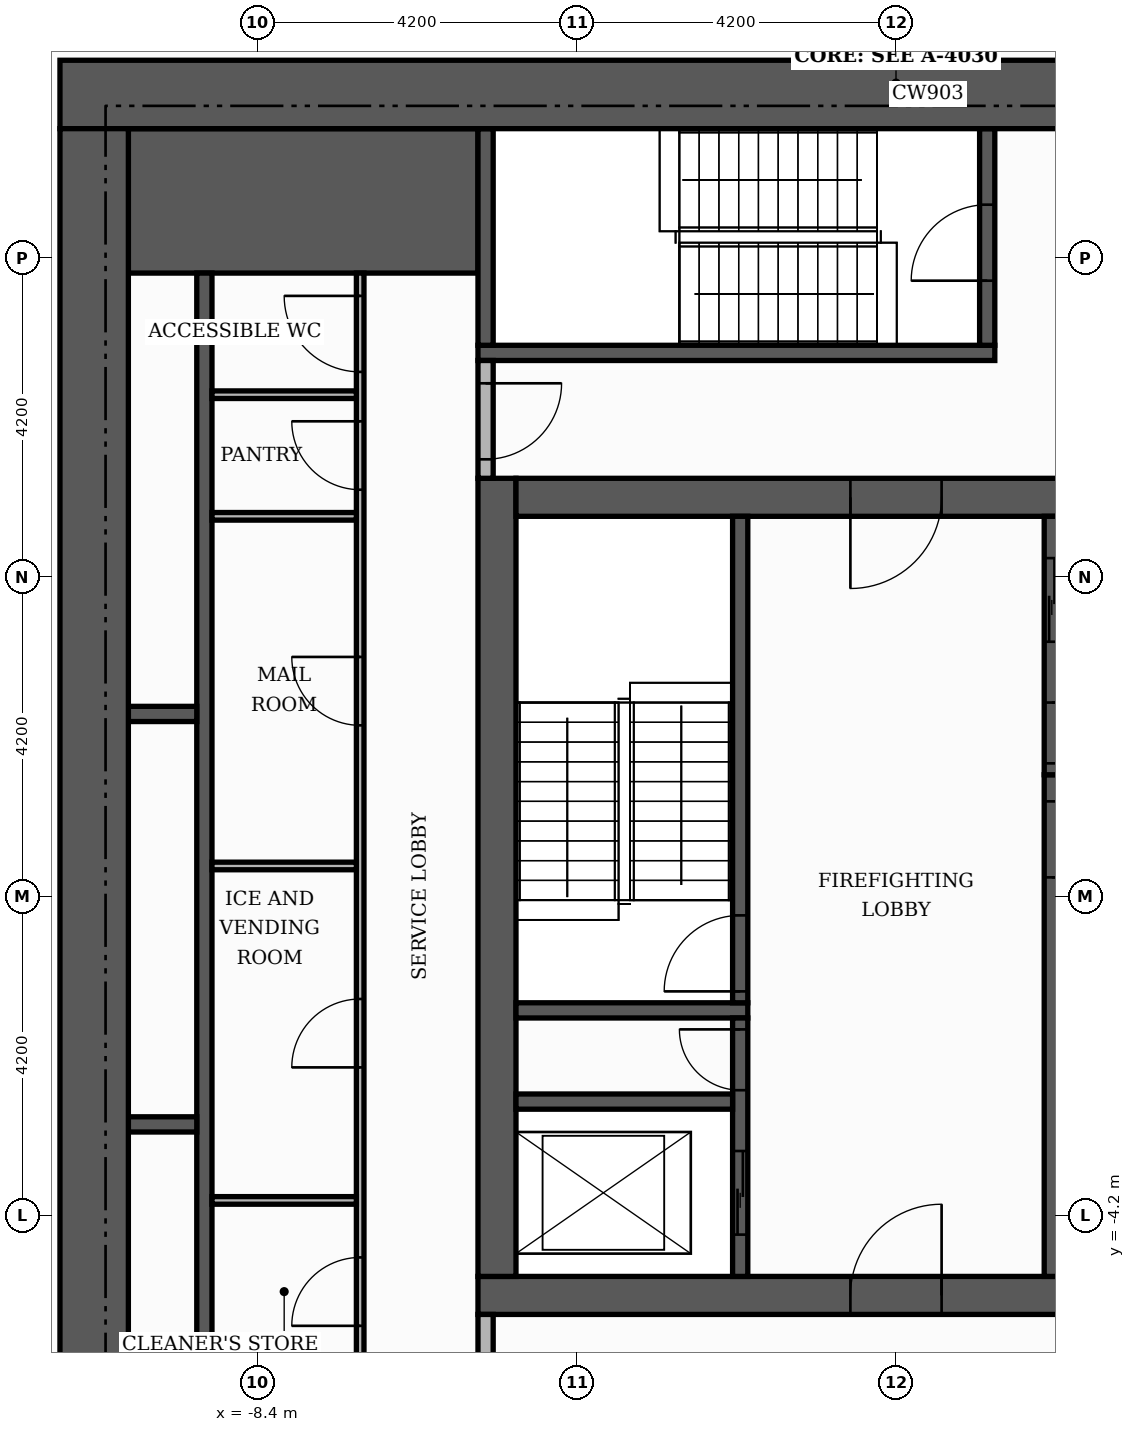
"""IFC4 building model, lengths in metres.
Left out: names, types, materials, properties, quantities, classifications, styles, units other than length and angle.
Written with IfcOpenShell. Run it as: python <this file> out.ifc"""

import sys

from ifc_helpers import new_model, si_unit, direction, frame, frame_2d, origin, place, context, subcontext, project, spatial, rectangle, extrude, element, fill, save


model = new_model("IFC4")
c1 = context("Model", 3, precision=1e-05, world=origin(), true_north=direction((0.0, 1.0)))
c2 = subcontext(c1, "Body", "Model", "MODEL_VIEW")
j1 = project(units=[si_unit("LENGTHUNIT", "METRE"), si_unit("PLANEANGLEUNIT", "RADIAN")], contexts=[c1])
p1 = place(None, origin())
s1 = spatial("IfcSite", under=j1, at=p1, CompositionType="ELEMENT")
p2 = place(p1, origin())
s2 = spatial("IfcBuilding", under=s1, at=p2, CompositionType="ELEMENT")
p3 = place(p2, frame((0.0, 0.0, 180.6)))
s3 = spatial("IfcBuildingStorey", under=s2, at=p3, CompositionType="ELEMENT", Elevation=180.6)
p4 = place(p3, frame((-5.5, -5.25, 0.0), z_axis=(0.0, 0.0, 1.0), x_axis=(1.0, 0.0, 0.0)))
e1 = element("IfcWall", 1, at=p4, inside=s3, PredefinedType="SHEAR", context=c2, shape_type="SweptSolid", body=[
    extrude(rectangle(XDim=11.0, YDim=0.5, at=frame_2d((5.5, 0.0))), origin(), (0.0, 0.0, 1.0), 7.38),
])
p5 = place(p4, frame((4.9, 0.0, 0.0)))
e2 = element("IfcOpeningElement", 2, at=p5, cuts=e1, PredefinedType="OPENING", context=c2, shape_type="SweptSolid", body=[
    extrude(rectangle(XDim=1.2, YDim=2.1, at=frame_2d((0.6, 1.05))), frame((0.0, 0.26, 0.0), z_axis=(0.0, -1.0, 0.0), x_axis=(1.0, 0.0, 0.0)), (0.0, 0.0, 1.0), 0.52),
])
p6 = place(p3, frame((-5.25, -5.0, 0.0), z_axis=(0.0, 0.0, 1.0), x_axis=(0.0, 1.0, 0.0)))
e3 = element("IfcWall", 3, at=p6, inside=s3, PredefinedType="SHEAR", context=c2, shape_type="SweptSolid", body=[
    extrude(rectangle(XDim=10.5, YDim=0.5, at=frame_2d((5.25, 0.0))), origin(), (0.0, 0.0, 1.0), 7.38),
])
p7 = place(p3, frame((-5.0, 5.25, 0.0), z_axis=(0.0, 0.0, 1.0), x_axis=(1.0, 0.0, 0.0)))
e4 = element("IfcWall", 4, at=p7, inside=s3, PredefinedType="SHEAR", context=c2, shape_type="SweptSolid", body=[
    extrude(rectangle(XDim=10.0, YDim=0.5, at=frame_2d((5.0, 0.0))), origin(), (0.0, 0.0, 1.0), 7.38),
])
p8 = place(p7, frame((4.4, 0.0, 0.0)))
e5 = element("IfcOpeningElement", 5, at=p8, cuts=e4, PredefinedType="OPENING", context=c2, shape_type="SweptSolid", body=[
    extrude(rectangle(XDim=1.2, YDim=2.1, at=frame_2d((0.6, 1.05))), frame((0.0, 0.26, 0.0), z_axis=(0.0, -1.0, 0.0), x_axis=(1.0, 0.0, 0.0)), (0.0, 0.0, 1.0), 0.52),
])
p9 = place(p3, frame((-10.1, 9.15, 0.0), z_axis=(0.0, 0.0, 1.0), x_axis=(1.0, 0.0, 0.0)))
e6 = element("IfcWall", 6, at=p9, inside=s3, PredefinedType="SHEAR", context=c2, shape_type="SweptSolid", body=[
    extrude(rectangle(XDim=4.6, YDim=1.9, at=frame_2d((2.3, 0.0))), origin(), (0.0, 0.0, 1.0), 7.38),
])
p10 = place(p3, frame((2.05, -5.0, 0.0), z_axis=(0.0, 0.0, 1.0), x_axis=(0.0, 1.0, 0.0)))
e7 = element("IfcWall", 7, at=p10, inside=s3, PredefinedType="SHEAR", context=c2, shape_type="SweptSolid", body=[
    extrude(rectangle(XDim=6.6, YDim=0.2, at=frame_2d((3.3, 0.0))), origin(), (0.0, 0.0, 1.0), 7.38),
])
p11 = place(p10, frame((5.25, 0.0, 0.0)))
e8 = element("IfcOpeningElement", 8, at=p11, cuts=e7, PredefinedType="OPENING", context=c2, shape_type="SweptSolid", body=[
    extrude(rectangle(XDim=1.0, YDim=2.1, at=frame_2d((0.5, 1.05))), frame((0.0, 0.11, 0.0), z_axis=(0.0, -1.0, 0.0), x_axis=(1.0, 0.0, 0.0)), (0.0, 0.0, 1.0), 0.22),
])
p12 = place(p3, frame((-5.0, -1.5, 0.0), z_axis=(0.0, 0.0, 1.0), x_axis=(1.0, 0.0, 0.0)))
e9 = element("IfcWall", 9, at=p12, inside=s3, PredefinedType="SHEAR", context=c2, shape_type="SweptSolid", body=[
    extrude(rectangle(XDim=3.05, YDim=0.2, at=frame_2d((1.525, 0.0))), origin(), (0.0, 0.0, 1.0), 7.38),
])
p13 = place(p3, frame((-2.05, -1.4, 0.0), z_axis=(0.0, 0.0, 1.0), x_axis=(0.0, 1.0, 0.0)))
e10 = element("IfcWall", 10, at=p13, inside=s3, PredefinedType="SHEAR", context=c2, shape_type="SweptSolid", body=[
    extrude(rectangle(XDim=6.4, YDim=0.2, at=frame_2d((3.2, 0.0))), origin(), (0.0, 0.0, 1.0), 7.38),
])
p14 = place(p13, frame((0.15, 0.0, 0.0)))
e11 = element("IfcOpeningElement", 11, at=p14, cuts=e10, PredefinedType="OPENING", context=c2, shape_type="SweptSolid", body=[
    extrude(rectangle(XDim=1.0, YDim=2.1, at=frame_2d((0.5, 1.05))), frame((0.0, 0.11, 0.0), z_axis=(0.0, -1.0, 0.0), x_axis=(1.0, 0.0, 0.0)), (0.0, 0.0, 1.0), 0.22),
])
p15 = place(p3, frame((-5.5, 7.15, 0.0), z_axis=(0.0, 0.0, 1.0), x_axis=(1.0, 0.0, 0.0)))
e12 = element("IfcWall", 12, at=p15, inside=s3, PredefinedType="SHEAR", context=c2, shape_type="SweptSolid", body=[
    extrude(rectangle(XDim=6.8, YDim=0.2, at=frame_2d((3.4, 0.0))), origin(), (0.0, 0.0, 1.0), 7.38),
])
p16 = place(p3, frame((-5.4, 7.25, 0.0), z_axis=(0.0, 0.0, 1.0), x_axis=(0.0, 1.0, 0.0)))
e13 = element("IfcWall", 13, at=p16, inside=s3, PredefinedType="SHEAR", context=c2, shape_type="SweptSolid", body=[
    extrude(rectangle(XDim=2.85, YDim=0.2, at=frame_2d((1.425, 0.0))), origin(), (0.0, 0.0, 1.0), 7.38),
])
p17 = place(p3, frame((1.2, 7.25, 0.0), z_axis=(0.0, 0.0, 1.0), x_axis=(0.0, 1.0, 0.0)))
e14 = element("IfcWall", 14, at=p17, inside=s3, PredefinedType="SHEAR", context=c2, shape_type="SweptSolid", body=[
    extrude(rectangle(XDim=2.85, YDim=0.2, at=frame_2d((1.425, 0.0))), origin(), (0.0, 0.0, 1.0), 7.38),
])
p18 = place(p17, frame((0.85, 0.0, 0.0)))
e15 = element("IfcOpeningElement", 15, at=p18, cuts=e14, PredefinedType="OPENING", context=c2, shape_type="SweptSolid", body=[
    extrude(rectangle(XDim=1.0, YDim=2.1, at=frame_2d((0.5, 1.05))), frame((0.0, 0.11, 0.0), z_axis=(0.0, -1.0, 0.0), x_axis=(1.0, 0.0, 0.0)), (0.0, 0.0, 1.0), 0.22),
])
p19 = place(p3, frame((-9.1, -8.2, 0.0), z_axis=(0.0, 0.0, 1.0), x_axis=(0.0, 1.0, 0.0)))
e16 = element("IfcWall", 16, at=p19, inside=s3, PredefinedType="SHEAR", context=c2, shape_type="SweptSolid", body=[
    extrude(rectangle(XDim=16.4, YDim=0.2, at=frame_2d((8.2, 0.0))), origin(), (0.0, 0.0, 1.0), 7.38),
])
p20 = place(p3, frame((-2.05, -5.0, 0.0), z_axis=(0.0, 0.0, 1.0), x_axis=(0.0, 1.0, 0.0)))
e17 = element("IfcWall", 17, at=p20, inside=s3, PredefinedType="SHEAR", context=c2, shape_type="SweptSolid", body=[
    extrude(rectangle(XDim=3.4, YDim=0.2, at=frame_2d((1.7, 0.0))), origin(), (0.0, 0.0, 1.0), 7.38),
])
p21 = place(p20, frame((0.55, 0.0, 0.0)))
e18 = element("IfcOpeningElement", 18, at=p21, cuts=e17, PredefinedType="OPENING", context=c2, shape_type="SweptSolid", body=[
    extrude(rectangle(XDim=1.1, YDim=2.1, at=frame_2d((0.55, 1.05))), frame((0.0, 0.11, 0.0), z_axis=(0.0, -1.0, 0.0), x_axis=(1.0, 0.0, 0.0)), (0.0, 0.0, 1.0), 0.22),
])
p22 = place(p20, frame((2.45, 0.0, 0.0)))
e19 = element("IfcOpeningElement", 19, at=p22, cuts=e17, PredefinedType="OPENING", context=c2, shape_type="SweptSolid", body=[
    extrude(rectangle(XDim=0.8, YDim=2.1, at=frame_2d((0.4, 1.05))), frame((0.0, 0.11, 0.0), z_axis=(0.0, -1.0, 0.0), x_axis=(1.0, 0.0, 0.0)), (0.0, 0.0, 1.0), 0.22),
])
p23 = place(p3, frame((-10.1, -3.0, 0.0), z_axis=(0.0, 0.0, 1.0), x_axis=(1.0, 0.0, 0.0)))
e20 = element("IfcWall", 20, at=p23, inside=s3, PredefinedType="SHEAR", context=c2, shape_type="SweptSolid", body=[
    extrude(rectangle(XDim=0.9, YDim=0.2, at=frame_2d((0.45, 0.0))), origin(), (0.0, 0.0, 1.0), 7.38),
])
p24 = place(p3, frame((-5.0, -2.7, 0.0), z_axis=(0.0, 0.0, 1.0), x_axis=(1.0, 0.0, 0.0)))
e21 = element("IfcWall", 21, at=p24, inside=s3, PredefinedType="SHEAR", context=c2, shape_type="SweptSolid", body=[
    extrude(rectangle(XDim=2.85, YDim=0.2, at=frame_2d((1.425, 0.0))), origin(), (0.0, 0.0, 1.0), 7.38),
])
p25 = place(p3, frame((2.05, 1.6, 0.0), z_axis=(0.0, 0.0, 1.0), x_axis=(0.0, 1.0, 0.0)))
e22 = element("IfcWall", 22, at=p25, inside=s3, PredefinedType="SHEAR", context=c2, shape_type="SweptSolid", body=[
    extrude(rectangle(XDim=3.4, YDim=0.2, at=frame_2d((1.7, 0.0))), origin(), (0.0, 0.0, 1.0), 7.38),
])
p26 = place(p25, frame((1.75, 0.0, 0.0)))
e23 = element("IfcOpeningElement", 23, at=p26, cuts=e22, PredefinedType="OPENING", context=c2, shape_type="SweptSolid", body=[
    extrude(rectangle(XDim=1.1, YDim=2.1, at=frame_2d((0.55, 1.05))), frame((0.0, 0.11, 0.0), z_axis=(0.0, -1.0, 0.0), x_axis=(1.0, 0.0, 0.0)), (0.0, 0.0, 1.0), 0.22),
])
p27 = place(p25, frame((0.15, 0.0, 0.0)))
e24 = element("IfcOpeningElement", 24, at=p27, cuts=e22, PredefinedType="OPENING", context=c2, shape_type="SweptSolid", body=[
    extrude(rectangle(XDim=0.8, YDim=2.1, at=frame_2d((0.4, 1.05))), frame((0.0, 0.11, 0.0), z_axis=(0.0, -1.0, 0.0), x_axis=(1.0, 0.0, 0.0)), (0.0, 0.0, 1.0), 0.22),
])
p28 = place(p3, frame((-10.1, 2.4, 0.0), z_axis=(0.0, 0.0, 1.0), x_axis=(1.0, 0.0, 0.0)))
e25 = element("IfcWall", 25, at=p28, inside=s3, PredefinedType="SHEAR", context=c2, shape_type="SweptSolid", body=[
    extrude(rectangle(XDim=0.9, YDim=0.2, at=frame_2d((0.45, 0.0))), origin(), (0.0, 0.0, 1.0), 7.38),
])
p29 = place(p3, frame((-11.0, 10.55, 0.0), z_axis=(0.0, 0.0, 1.0), x_axis=(1.0, 0.0, 0.0)))
e26 = element("IfcWall", 26, at=p29, inside=s3, PredefinedType="SHEAR", context=c2, shape_type="SweptSolid", body=[
    extrude(rectangle(XDim=22.0, YDim=0.9, at=frame_2d((11.0, 0.0))), origin(), (0.0, 0.0, 1.0), 7.38),
])
p30 = place(p29, frame((13.3, 0.0, 0.0)))
e27 = element("IfcOpeningElement", 27, at=p30, cuts=e26, PredefinedType="OPENING", context=c2, shape_type="SweptSolid", body=[
    extrude(rectangle(XDim=1.8, YDim=2.2, at=frame_2d((0.9, 1.1))), frame((0.0, 0.46, 0.0), z_axis=(0.0, -1.0, 0.0), x_axis=(1.0, 0.0, 0.0)), (0.0, 0.0, 1.0), 0.92),
])
p31 = place(p3, frame((-10.55, -10.1, 0.0), z_axis=(0.0, 0.0, 1.0), x_axis=(0.0, 1.0, 0.0)))
e28 = element("IfcWall", 28, at=p31, inside=s3, PredefinedType="SHEAR", context=c2, shape_type="SweptSolid", body=[
    extrude(rectangle(XDim=20.2, YDim=0.9, at=frame_2d((10.1, 0.0))), origin(), (0.0, 0.0, 1.0), 7.38),
])
p32 = place(p3, frame((-5.4, -10.1, 0.0), z_axis=(0.0, 0.0, 1.0), x_axis=(0.0, 1.0, 0.0)))
e29 = element("IfcWall", 29, at=p32, inside=s3, PredefinedType="PARTITIONING", context=c2, shape_type="SweptSolid", body=[
    extrude(rectangle(XDim=4.6, YDim=0.2, at=frame_2d((2.3, 0.0))), origin(), (0.0, 0.0, 1.0), 7.38),
])
p33 = place(p32, frame((2.9, 0.0, 0.0)))
e30 = element("IfcOpeningElement", 30, at=p33, cuts=e29, PredefinedType="OPENING", context=c2, shape_type="SweptSolid", body=[
    extrude(rectangle(XDim=1.0, YDim=2.1, at=frame_2d((0.5, 1.05))), frame((0.0, 0.11, 0.0), z_axis=(0.0, -1.0, 0.0), x_axis=(1.0, 0.0, 0.0)), (0.0, 0.0, 1.0), 0.22),
])
p34 = place(p3, frame((-7.05, -8.2, 0.0), z_axis=(0.0, 0.0, 1.0), x_axis=(0.0, 1.0, 0.0)))
e31 = element("IfcWall", 31, at=p34, inside=s3, PredefinedType="PARTITIONING", context=c2, shape_type="SweptSolid", body=[
    extrude(rectangle(XDim=16.4, YDim=0.1, at=frame_2d((8.2, 0.0))), origin(), (0.0, 0.0, 1.0), 7.38),
])
p35 = place(p34, frame((0.45, 0.0, 0.0)))
e32 = element("IfcOpeningElement", 32, at=p35, cuts=e31, PredefinedType="OPENING", context=c2, shape_type="SweptSolid", body=[
    extrude(rectangle(XDim=0.9, YDim=2.1, at=frame_2d((0.45, 1.05))), frame((0.0, 0.06, 0.0), z_axis=(0.0, -1.0, 0.0), x_axis=(1.0, 0.0, 0.0)), (0.0, 0.0, 1.0), 0.12),
])
p36 = place(p34, frame((2.55, 0.0, 0.0)))
e33 = element("IfcOpeningElement", 33, at=p36, cuts=e31, PredefinedType="OPENING", context=c2, shape_type="SweptSolid", body=[
    extrude(rectangle(XDim=0.9, YDim=2.1, at=frame_2d((0.45, 1.05))), frame((0.0, 0.06, 0.0), z_axis=(0.0, -1.0, 0.0), x_axis=(1.0, 0.0, 0.0)), (0.0, 0.0, 1.0), 0.12),
])
p37 = place(p34, frame((5.95, 0.0, 0.0)))
e34 = element("IfcOpeningElement", 34, at=p37, cuts=e31, PredefinedType="OPENING", context=c2, shape_type="SweptSolid", body=[
    extrude(rectangle(XDim=0.9, YDim=2.1, at=frame_2d((0.45, 1.05))), frame((0.0, 0.06, 0.0), z_axis=(0.0, -1.0, 0.0), x_axis=(1.0, 0.0, 0.0)), (0.0, 0.0, 1.0), 0.12),
])
p38 = place(p34, frame((10.45, 0.0, 0.0)))
e35 = element("IfcOpeningElement", 35, at=p38, cuts=e31, PredefinedType="OPENING", context=c2, shape_type="SweptSolid", body=[
    extrude(rectangle(XDim=0.9, YDim=2.1, at=frame_2d((0.45, 1.05))), frame((0.0, 0.06, 0.0), z_axis=(0.0, -1.0, 0.0), x_axis=(1.0, 0.0, 0.0)), (0.0, 0.0, 1.0), 0.12),
])
p39 = place(p34, frame((13.55, 0.0, 0.0)))
e36 = element("IfcOpeningElement", 36, at=p39, cuts=e31, PredefinedType="OPENING", context=c2, shape_type="SweptSolid", body=[
    extrude(rectangle(XDim=0.9, YDim=2.1, at=frame_2d((0.45, 1.05))), frame((0.0, 0.06, 0.0), z_axis=(0.0, -1.0, 0.0), x_axis=(1.0, 0.0, 0.0)), (0.0, 0.0, 1.0), 0.12),
])
p40 = place(p34, frame((15.1, 0.0, 0.0)))
e37 = element("IfcOpeningElement", 37, at=p40, cuts=e31, PredefinedType="OPENING", context=c2, shape_type="SweptSolid", body=[
    extrude(rectangle(XDim=1.0, YDim=2.1, at=frame_2d((0.5, 1.05))), frame((0.0, 0.06, 0.0), z_axis=(0.0, -1.0, 0.0), x_axis=(1.0, 0.0, 0.0)), (0.0, 0.0, 1.0), 0.12),
])
for number, where, z_axis, x_axis in (
    (38, (-9.0, -4.0, 0.0), (0.0, 0.0, 1.0), (1.0, 0.0, 0.0)),
    (39, (-9.0, 0.4, 0.0), (0.0, 0.0, 1.0), (1.0, 0.0, 0.0)),
    (40, (-9.0, 5.0, 0.0), (0.0, 0.0, 1.0), (1.0, 0.0, 0.0)),
):
    element("IfcWall", number, at=place(p3, frame(where, z_axis=z_axis, x_axis=x_axis)), inside=s3, PredefinedType="PARTITIONING", context=c2, shape_type="SweptSolid", body=[
        extrude(rectangle(XDim=1.9, YDim=0.1, at=frame_2d((0.95, 0.0))), origin(), (0.0, 0.0, 1.0), 7.38),
    ])
p41 = place(p3, frame((-5.4, 5.5, 0.0), z_axis=(0.0, 0.0, 1.0), x_axis=(0.0, 1.0, 0.0)))
e41 = element("IfcWall", 41, at=p41, inside=s3, PredefinedType="PARTITIONING", context=c2, shape_type="SweptSolid", body=[
    extrude(rectangle(XDim=1.55, YDim=0.2, at=frame_2d((0.775, 0.0))), origin(), (0.0, 0.0, 1.0), 7.38),
])
p42 = place(p41, frame((0.25, 0.0, 0.0)))
e42 = element("IfcOpeningElement", 42, at=p42, cuts=e41, PredefinedType="OPENING", context=c2, shape_type="SweptSolid", body=[
    extrude(rectangle(XDim=1.0, YDim=2.1, at=frame_2d((0.5, 1.05))), frame((0.0, 0.11, 0.0), z_axis=(0.0, -1.0, 0.0), x_axis=(1.0, 0.0, 0.0)), (0.0, 0.0, 1.0), 0.22),
])
p43 = place(p3, frame((-9.0, 6.6, 0.0), z_axis=(0.0, 0.0, 1.0), x_axis=(1.0, 0.0, 0.0)))
e43 = element("IfcWall", 43, at=p43, inside=s3, PredefinedType="PARTITIONING", context=c2, shape_type="SweptSolid", body=[
    extrude(rectangle(XDim=1.9, YDim=0.1, at=frame_2d((0.95, 0.0))), origin(), (0.0, 0.0, 1.0), 7.38),
])
p44 = place(p26, origin())
e44 = element("IfcDoor", 44, at=p44, inside=s3, OperationType="SLIDING_TO_LEFT", PredefinedType="DOOR", context=c2, shape_type="SweptSolid", body=[
    extrude(rectangle(XDim=1.1, YDim=2.1, at=frame_2d((0.55, 1.05))), frame((0.0, 0.025, 0.0), z_axis=(0.0, -1.0, 0.0), x_axis=(1.0, 0.0, 0.0)), (0.0, 0.0, 1.0), 0.05),
])
fill(e23, e44)
p45 = place(p21, origin())
e45 = element("IfcDoor", 45, at=p45, inside=s3, OperationType="SLIDING_TO_LEFT", PredefinedType="DOOR", context=c2, shape_type="SweptSolid", body=[
    extrude(rectangle(XDim=1.1, YDim=2.1, at=frame_2d((0.55, 1.05))), frame((0.0, 0.025, 0.0), z_axis=(0.0, -1.0, 0.0), x_axis=(1.0, 0.0, 0.0)), (0.0, 0.0, 1.0), 0.05),
])
fill(e18, e45)
p46 = place(p14, origin())
e46 = element("IfcDoor", 46, at=p46, inside=s3, OperationType="SINGLE_SWING_LEFT", PredefinedType="DOOR", context=c2, shape_type="SweptSolid", body=[
    extrude(rectangle(XDim=1.0, YDim=2.1, at=frame_2d((0.5, 1.05))), frame((0.0, 0.025, 0.0), z_axis=(0.0, -1.0, 0.0), x_axis=(1.0, 0.0, 0.0)), (0.0, 0.0, 1.0), 0.05),
])
fill(e11, e46)
p47 = place(p11, frame((1.0, 0.0, 0.0), z_axis=(0.0, 0.0, 1.0), x_axis=(-1.0, 0.0, 0.0)))
e47 = element("IfcDoor", 47, at=p47, inside=s3, OperationType="SINGLE_SWING_LEFT", PredefinedType="DOOR", context=c2, shape_type="SweptSolid", body=[
    extrude(rectangle(XDim=1.0, YDim=2.1, at=frame_2d((0.5, 1.05))), frame((0.0, 0.025, 0.0), z_axis=(0.0, -1.0, 0.0), x_axis=(1.0, 0.0, 0.0)), (0.0, 0.0, 1.0), 0.05),
])
fill(e8, e47)
p48 = place(p27, frame((0.8, 0.0, 0.0), z_axis=(0.0, 0.0, 1.0), x_axis=(-1.0, 0.0, 0.0)))
e48 = element("IfcDoor", 48, at=p48, inside=s3, OperationType="SINGLE_SWING_RIGHT", PredefinedType="DOOR", context=c2, shape_type="SweptSolid", body=[
    extrude(rectangle(XDim=0.8, YDim=2.1, at=frame_2d((0.4, 1.05))), frame((0.0, 0.025, 0.0), z_axis=(0.0, -1.0, 0.0), x_axis=(1.0, 0.0, 0.0)), (0.0, 0.0, 1.0), 0.05),
])
fill(e24, e48)
p49 = place(p22, origin())
e49 = element("IfcDoor", 49, at=p49, inside=s3, OperationType="SINGLE_SWING_RIGHT", PredefinedType="DOOR", context=c2, shape_type="SweptSolid", body=[
    extrude(rectangle(XDim=0.8, YDim=2.1, at=frame_2d((0.4, 1.05))), frame((0.0, 0.025, 0.0), z_axis=(0.0, -1.0, 0.0), x_axis=(1.0, 0.0, 0.0)), (0.0, 0.0, 1.0), 0.05),
])
fill(e19, e49)
p50 = place(p8, frame((1.2, 0.0, 0.0), z_axis=(0.0, 0.0, 1.0), x_axis=(-1.0, 0.0, 0.0)))
e50 = element("IfcDoor", 50, at=p50, inside=s3, OperationType="SINGLE_SWING_LEFT", PredefinedType="DOOR", context=c2, shape_type="SweptSolid", body=[
    extrude(rectangle(XDim=1.2, YDim=2.1, at=frame_2d((0.6, 1.05))), frame((0.0, 0.025, 0.0), z_axis=(0.0, -1.0, 0.0), x_axis=(1.0, 0.0, 0.0)), (0.0, 0.0, 1.0), 0.05),
])
fill(e5, e50)
p51 = place(p5, origin())
e51 = element("IfcDoor", 51, at=p51, inside=s3, OperationType="SINGLE_SWING_RIGHT", PredefinedType="DOOR", context=c2, shape_type="SweptSolid", body=[
    extrude(rectangle(XDim=1.2, YDim=2.1, at=frame_2d((0.6, 1.05))), frame((0.0, 0.025, 0.0), z_axis=(0.0, -1.0, 0.0), x_axis=(1.0, 0.0, 0.0)), (0.0, 0.0, 1.0), 0.05),
])
fill(e2, e51)
p52 = place(p18, origin())
e52 = element("IfcDoor", 52, at=p52, inside=s3, OperationType="SINGLE_SWING_LEFT", PredefinedType="DOOR", context=c2, shape_type="SweptSolid", body=[
    extrude(rectangle(XDim=1.0, YDim=2.1, at=frame_2d((0.5, 1.05))), frame((0.0, 0.025, 0.0), z_axis=(0.0, -1.0, 0.0), x_axis=(1.0, 0.0, 0.0)), (0.0, 0.0, 1.0), 0.05),
])
fill(e15, e52)
p53 = place(p42, frame((1.0, 0.0, 0.0), z_axis=(0.0, 0.0, 1.0), x_axis=(-1.0, 0.0, 0.0)))
e53 = element("IfcDoor", 53, at=p53, inside=s3, OperationType="SINGLE_SWING_RIGHT", PredefinedType="DOOR", context=c2, shape_type="SweptSolid", body=[
    extrude(rectangle(XDim=1.0, YDim=2.1, at=frame_2d((0.5, 1.05))), frame((0.0, 0.025, 0.0), z_axis=(0.0, -1.0, 0.0), x_axis=(1.0, 0.0, 0.0)), (0.0, 0.0, 1.0), 0.05),
])
fill(e42, e53)
p54 = place(p36, origin())
e54 = element("IfcDoor", 54, at=p54, inside=s3, OperationType="SINGLE_SWING_LEFT", PredefinedType="DOOR", context=c2, shape_type="SweptSolid", body=[
    extrude(rectangle(XDim=0.9, YDim=2.1, at=frame_2d((0.45, 1.05))), frame((0.0, 0.025, 0.0), z_axis=(0.0, -1.0, 0.0), x_axis=(1.0, 0.0, 0.0)), (0.0, 0.0, 1.0), 0.05),
])
fill(e33, e54)
p55 = place(p37, origin())
e55 = element("IfcDoor", 55, at=p55, inside=s3, OperationType="SINGLE_SWING_LEFT", PredefinedType="DOOR", context=c2, shape_type="SweptSolid", body=[
    extrude(rectangle(XDim=0.9, YDim=2.1, at=frame_2d((0.45, 1.05))), frame((0.0, 0.025, 0.0), z_axis=(0.0, -1.0, 0.0), x_axis=(1.0, 0.0, 0.0)), (0.0, 0.0, 1.0), 0.05),
])
fill(e34, e55)
p56 = place(p38, origin())
e56 = element("IfcDoor", 56, at=p56, inside=s3, OperationType="SINGLE_SWING_RIGHT", PredefinedType="DOOR", context=c2, shape_type="SweptSolid", body=[
    extrude(rectangle(XDim=0.9, YDim=2.1, at=frame_2d((0.45, 1.05))), frame((0.0, 0.025, 0.0), z_axis=(0.0, -1.0, 0.0), x_axis=(1.0, 0.0, 0.0)), (0.0, 0.0, 1.0), 0.05),
])
fill(e35, e56)
p57 = place(p39, origin())
e57 = element("IfcDoor", 57, at=p57, inside=s3, OperationType="SINGLE_SWING_RIGHT", PredefinedType="DOOR", context=c2, shape_type="SweptSolid", body=[
    extrude(rectangle(XDim=0.9, YDim=2.1, at=frame_2d((0.45, 1.05))), frame((0.0, 0.025, 0.0), z_axis=(0.0, -1.0, 0.0), x_axis=(1.0, 0.0, 0.0)), (0.0, 0.0, 1.0), 0.05),
])
fill(e36, e57)
p58 = place(p40, origin())
e58 = element("IfcDoor", 58, at=p58, inside=s3, OperationType="SINGLE_SWING_RIGHT", PredefinedType="DOOR", context=c2, shape_type="SweptSolid", body=[
    extrude(rectangle(XDim=1.0, YDim=2.1, at=frame_2d((0.5, 1.05))), frame((0.0, 0.025, 0.0), z_axis=(0.0, -1.0, 0.0), x_axis=(1.0, 0.0, 0.0)), (0.0, 0.0, 1.0), 0.05),
])
fill(e37, e58)
save(model, sys.argv[1])
